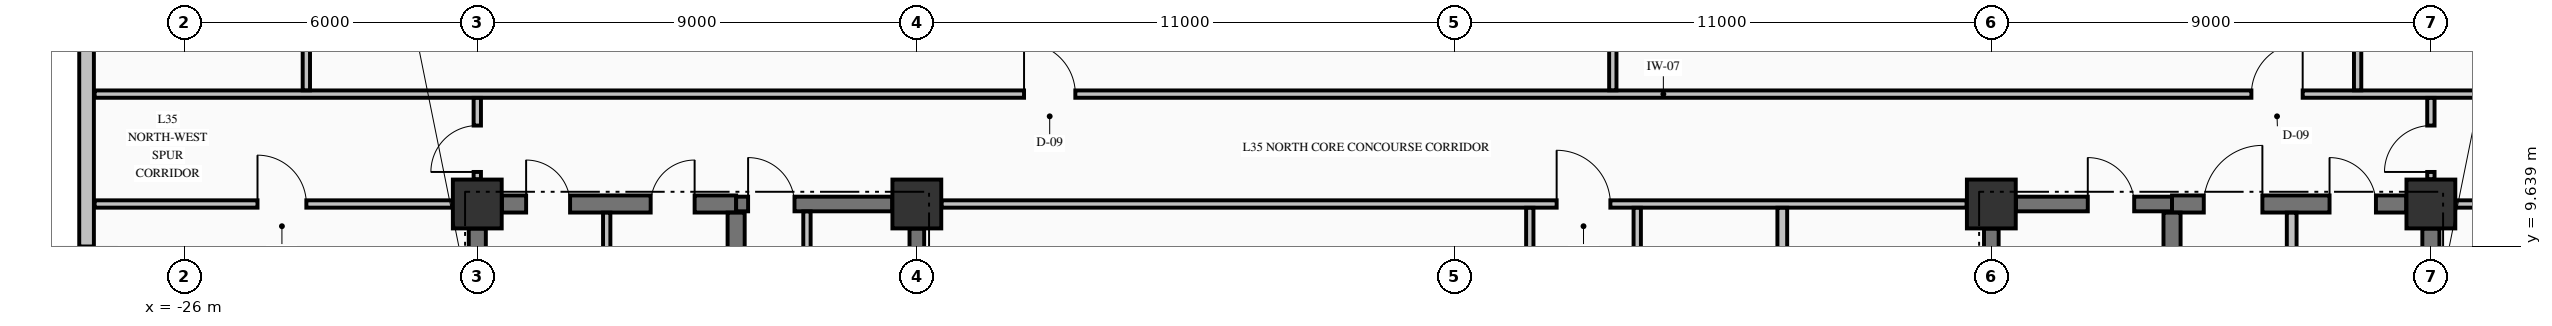
"""IFC4 building model, lengths in metres.
Left out: names, types, materials, properties, quantities, classifications, styles, units other than length and angle.
Written with IfcOpenShell. Run it as: python <this file> out.ifc"""

import sys

from ifc_helpers import new_model, si_unit, direction, frame, frame_2d, origin, origin_2d, place, context, subcontext, project, spatial, rectangle, extrude, element, fill, save


model = new_model("IFC4")
c1 = context("Model", 3, precision=1e-05, world=origin(), true_north=direction((0.0, 1.0)))
c2 = subcontext(c1, "Body", "Model", "MODEL_VIEW")
j1 = project(units=[si_unit("LENGTHUNIT", "METRE"), si_unit("PLANEANGLEUNIT", "RADIAN")], contexts=[c1])
p1 = place(None, origin())
s1 = spatial("IfcSite", under=j1, at=p1, CompositionType="ELEMENT")
p2 = place(p1, origin())
s2 = spatial("IfcBuilding", under=s1, at=p2, CompositionType="ELEMENT")
p3 = place(p2, frame((0.0, 0.0, 139.2)))
s3 = spatial("IfcBuildingStorey", under=s2, at=p3, CompositionType="ELEMENT", Elevation=139.2)
for number, where, z_axis, x_axis in (
    (1, (-20.0, 10.5, -0.25), (0.0, 0.0, 1.0), (1.0, 0.0, 0.0)),
    (2, (-11.0, 10.5, -0.25), (0.0, 0.0, 1.0), (1.0, 0.0, 0.0)),
    (3, (11.0, 10.5, -0.25), (0.0, 0.0, 1.0), (1.0, 0.0, 0.0)),
    (4, (20.0, 10.5, -0.25), (0.0, 0.0, 1.0), (1.0, 0.0, 0.0)),
):
    element("IfcColumn", number, at=place(p3, frame(where, z_axis=z_axis, x_axis=x_axis)), inside=s3, PredefinedType="COLUMN", context=c2, shape_type="SweptSolid", body=[
        extrude(rectangle(XDim=1.0, YDim=1.0, at=origin_2d()), origin(), (0.0, 0.0, 1.0), 3.495),
    ])
p4 = place(p3, frame((-28.0, 20.37, 0.0), z_axis=(0.0, 0.0, 1.0), x_axis=(0.0, -1.0, 0.0)))
e5 = element("IfcWall", 5, at=p4, inside=s3, PredefinedType="STANDARD", context=c2, shape_type="SweptSolid", body=[
    extrude(rectangle(XDim=10.74, YDim=0.3, at=frame_2d((5.37, 0.0))), origin(), (0.0, 0.0, 1.0), 2.637),
])
p5 = place(p3, frame((-19.496, 10.5, 0.0), z_axis=(0.0, 0.0, 1.0), x_axis=(1.0, 0.0, 0.0)))
e6 = element("IfcWall", 6, at=p5, inside=s3, PredefinedType="SHEAR", context=c2, shape_type="SweptSolid", body=[
    extrude(rectangle(XDim=4.796, YDim=0.35, at=frame_2d((2.398, 0.0))), origin(), (0.0, 0.0, 1.0), 3.245),
])
p6 = place(p5, frame((0.496, 0.0, 0.0)))
e7 = element("IfcOpeningElement", 7, at=p6, cuts=e6, PredefinedType="OPENING", context=c2, shape_type="SweptSolid", body=[
    extrude(rectangle(XDim=0.9, YDim=2.15, at=frame_2d((0.45, 1.075))), frame((0.0, 0.185, 0.0), z_axis=(0.0, -1.0, 0.0), x_axis=(1.0, 0.0, 0.0)), (0.0, 0.0, 1.0), 0.37),
])
p7 = place(p5, frame((3.046, 0.0, 0.0)))
e8 = element("IfcOpeningElement", 8, at=p7, cuts=e6, PredefinedType="OPENING", context=c2, shape_type="SweptSolid", body=[
    extrude(rectangle(XDim=0.9, YDim=2.15, at=frame_2d((0.45, 1.075))), frame((0.0, 0.185, 0.0), z_axis=(0.0, -1.0, 0.0), x_axis=(1.0, 0.0, 0.0)), (0.0, 0.0, 1.0), 0.37),
])
p8 = place(p3, frame((-14.7, 10.5, 0.0), z_axis=(0.0, 0.0, 1.0), x_axis=(1.0, 0.0, 0.0)))
e9 = element("IfcWall", 9, at=p8, inside=s3, PredefinedType="SHEAR", context=c2, shape_type="SweptSolid", body=[
    extrude(rectangle(XDim=3.196, YDim=0.3, at=frame_2d((1.598, 0.0))), origin(), (0.0, 0.0, 1.0), 3.245),
])
p9 = place(p8, frame((0.245, 0.0, 0.0)))
e10 = element("IfcOpeningElement", 10, at=p9, cuts=e9, PredefinedType="OPENING", context=c2, shape_type="SweptSolid", body=[
    extrude(rectangle(XDim=0.95, YDim=2.15, at=frame_2d((0.475, 1.075))), frame((0.0, 0.16, 0.0), z_axis=(0.0, -1.0, 0.0), x_axis=(1.0, 0.0, 0.0)), (0.0, 0.0, 1.0), 0.32),
])
p10 = place(p3, frame((11.504, 10.5, 0.0), z_axis=(0.0, 0.0, 1.0), x_axis=(1.0, 0.0, 0.0)))
e11 = element("IfcWall", 11, at=p10, inside=s3, PredefinedType="SHEAR", context=c2, shape_type="SweptSolid", body=[
    extrude(rectangle(XDim=3.196, YDim=0.3, at=frame_2d((1.598, 0.0))), origin(), (0.0, 0.0, 1.0), 3.245),
])
p11 = place(p10, frame((1.471, 0.0, 0.0)))
e12 = element("IfcOpeningElement", 12, at=p11, cuts=e11, PredefinedType="OPENING", context=c2, shape_type="SweptSolid", body=[
    extrude(rectangle(XDim=0.95, YDim=2.15, at=frame_2d((0.475, 1.075))), frame((0.0, 0.16, 0.0), z_axis=(0.0, -1.0, 0.0), x_axis=(1.0, 0.0, 0.0)), (0.0, 0.0, 1.0), 0.32),
])
p12 = place(p3, frame((14.7, 10.5, 0.0), z_axis=(0.0, 0.0, 1.0), x_axis=(1.0, 0.0, 0.0)))
e13 = element("IfcWall", 13, at=p12, inside=s3, PredefinedType="SHEAR", context=c2, shape_type="SweptSolid", body=[
    extrude(rectangle(XDim=4.796, YDim=0.35, at=frame_2d((2.398, 0.0))), origin(), (0.0, 0.0, 1.0), 3.245),
])
p13 = place(p12, frame((0.65, 0.0, 0.0)))
e14 = element("IfcOpeningElement", 14, at=p13, cuts=e13, PredefinedType="OPENING", context=c2, shape_type="SweptSolid", body=[
    extrude(rectangle(XDim=1.2, YDim=2.15, at=frame_2d((0.6, 1.075))), frame((0.0, 0.185, 0.0), z_axis=(0.0, -1.0, 0.0), x_axis=(1.0, 0.0, 0.0)), (0.0, 0.0, 1.0), 0.37),
])
p14 = place(p12, frame((3.225, 0.0, 0.0)))
e15 = element("IfcOpeningElement", 15, at=p14, cuts=e13, PredefinedType="OPENING", context=c2, shape_type="SweptSolid", body=[
    extrude(rectangle(XDim=0.95, YDim=2.15, at=frame_2d((0.475, 1.075))), frame((0.0, 0.185, 0.0), z_axis=(0.0, -1.0, 0.0), x_axis=(1.0, 0.0, 0.0)), (0.0, 0.0, 1.0), 0.37),
])
p15 = place(p3, frame((-27.835, 10.5, 0.0), z_axis=(0.0, 0.0, 1.0), x_axis=(1.0, 0.0, 0.0)))
e16 = element("IfcWall", 16, at=p15, inside=s3, PredefinedType="PARTITIONING", context=c2, shape_type="SweptSolid", body=[
    extrude(rectangle(XDim=7.329, YDim=0.15, at=frame_2d((3.665, 0.0))), origin(), (0.0, 0.0, 1.0), 3.245),
])
p16 = place(p15, frame((3.335, 0.0, 0.0)))
e17 = element("IfcOpeningElement", 17, at=p16, cuts=e16, PredefinedType="OPENING", context=c2, shape_type="SweptSolid", body=[
    extrude(rectangle(XDim=1.0, YDim=2.15, at=frame_2d((0.5, 1.075))), frame((0.0, 0.085, 0.0), z_axis=(0.0, -1.0, 0.0), x_axis=(1.0, 0.0, 0.0)), (0.0, 0.0, 1.0), 0.17),
])
p17 = place(p3, frame((-10.494, 10.5, 0.0), z_axis=(0.0, 0.0, 1.0), x_axis=(1.0, 0.0, 0.0)))
e18 = element("IfcWall", 18, at=p17, inside=s3, PredefinedType="PARTITIONING", context=c2, shape_type="SweptSolid", body=[
    extrude(rectangle(XDim=20.988, YDim=0.15, at=frame_2d((10.494, 0.0))), origin(), (0.0, 0.0, 1.0), 3.245),
])
p18 = place(p17, frame((12.594, 0.0, 0.0)))
e19 = element("IfcOpeningElement", 19, at=p18, cuts=e18, PredefinedType="OPENING", context=c2, shape_type="SweptSolid", body=[
    extrude(rectangle(XDim=1.1, YDim=2.15, at=frame_2d((0.55, 1.075))), frame((0.0, 0.085, 0.0), z_axis=(0.0, -1.0, 0.0), x_axis=(1.0, 0.0, 0.0)), (0.0, 0.0, 1.0), 0.17),
])
p19 = place(p3, frame((20.506, 10.5, 0.0), z_axis=(0.0, 0.0, 1.0), x_axis=(1.0, 0.0, 0.0)))
e20 = element("IfcWall", 20, at=p19, inside=s3, PredefinedType="PARTITIONING", context=c2, shape_type="SweptSolid", body=[
    extrude(rectangle(XDim=2.329, YDim=0.15, at=frame_2d((1.165, 0.0))), origin(), (0.0, 0.0, 1.0), 3.245),
])
p20 = place(p19, frame((0.519, 0.0, 0.0)))
e21 = element("IfcOpeningElement", 21, at=p20, cuts=e20, PredefinedType="OPENING", context=c2, shape_type="SweptSolid", body=[
    extrude(rectangle(XDim=0.95, YDim=2.15, at=frame_2d((0.475, 1.075))), frame((0.0, 0.085, 0.0), z_axis=(0.0, -1.0, 0.0), x_axis=(1.0, 0.0, 0.0)), (0.0, 0.0, 1.0), 0.17),
])
p21 = place(p3, frame((-27.835, 12.75, 0.0), z_axis=(0.0, 0.0, 1.0), x_axis=(1.0, 0.0, 0.0)))
e22 = element("IfcWall", 22, at=p21, inside=s3, PredefinedType="PARTITIONING", context=c2, shape_type="SweptSolid", body=[
    extrude(rectangle(XDim=50.67, YDim=0.15, at=frame_2d((25.335, 0.0))), origin(), (0.0, 0.0, 1.0), 3.245),
])
p22 = place(p21, frame((19.03, 0.0, 0.0)))
e23 = element("IfcOpeningElement", 23, at=p22, cuts=e22, PredefinedType="OPENING", context=c2, shape_type="SweptSolid", body=[
    extrude(rectangle(XDim=1.05, YDim=2.15, at=frame_2d((0.525, 1.075))), frame((0.0, 0.085, 0.0), z_axis=(0.0, -1.0, 0.0), x_axis=(1.0, 0.0, 0.0)), (0.0, 0.0, 1.0), 0.17),
])
p23 = place(p21, frame((44.16, 0.0, 0.0)))
e24 = element("IfcOpeningElement", 24, at=p23, cuts=e22, PredefinedType="OPENING", context=c2, shape_type="SweptSolid", body=[
    extrude(rectangle(XDim=1.05, YDim=2.15, at=frame_2d((0.525, 1.075))), frame((0.0, 0.085, 0.0), z_axis=(0.0, -1.0, 0.0), x_axis=(1.0, 0.0, 0.0)), (0.0, 0.0, 1.0), 0.17),
])
p24 = place(p3, frame((-20.0, 0.504, 0.0), z_axis=(0.0, 0.0, 1.0), x_axis=(0.0, 1.0, 0.0)))
e25 = element("IfcWall", 25, at=p24, inside=s3, PredefinedType="SHEAR", context=c2, shape_type="SweptSolid", body=[
    extrude(rectangle(XDim=9.492, YDim=0.35, at=frame_2d((4.746, 0.0))), origin(), (0.0, 0.0, 1.0), 3.245),
])
p25 = place(p3, frame((-14.7, 5.852, 0.0), z_axis=(0.0, 0.0, 1.0), x_axis=(0.0, 1.0, 0.0)))
e26 = element("IfcWall", 26, at=p25, inside=s3, PredefinedType="SHEAR", context=c2, shape_type="SweptSolid", body=[
    extrude(rectangle(XDim=4.471, YDim=0.35, at=frame_2d((2.235, 0.0))), origin(), (0.0, 0.0, 1.0), 3.245),
])
for number, where, z_axis, x_axis in (
    (27, (-11.0, 5.852, 0.0), (0.0, 0.0, 1.0), (0.0, 1.0, 0.0)),
    (28, (11.0, 5.852, 0.0), (0.0, 0.0, 1.0), (0.0, 1.0, 0.0)),
):
    element("IfcWall", number, at=place(p3, frame(where, z_axis=z_axis, x_axis=x_axis)), inside=s3, PredefinedType="SHEAR", context=c2, shape_type="SweptSolid", body=[
        extrude(rectangle(XDim=4.144, YDim=0.3, at=frame_2d((2.072, 0.0))), origin(), (0.0, 0.0, 1.0), 3.245),
    ])
p26 = place(p3, frame((14.7, 5.852, 0.0), z_axis=(0.0, 0.0, 1.0), x_axis=(0.0, 1.0, 0.0)))
e29 = element("IfcWall", 29, at=p26, inside=s3, PredefinedType="SHEAR", context=c2, shape_type="SweptSolid", body=[
    extrude(rectangle(XDim=4.471, YDim=0.35, at=frame_2d((2.235, 0.0))), origin(), (0.0, 0.0, 1.0), 3.245),
])
p27 = place(p3, frame((20.0, 5.377, 0.0), z_axis=(0.0, 0.0, 1.0), x_axis=(0.0, 1.0, 0.0)))
e30 = element("IfcWall", 30, at=p27, inside=s3, PredefinedType="SHEAR", context=c2, shape_type="SweptSolid", body=[
    extrude(rectangle(XDim=4.619, YDim=0.35, at=frame_2d((2.31, 0.0))), origin(), (0.0, 0.0, 1.0), 3.245),
])
p28 = place(p3, frame((-23.5, 12.828, 0.0), z_axis=(0.0, 0.0, 1.0), x_axis=(0.0, 1.0, 0.0)))
e31 = element("IfcWall", 31, at=p28, inside=s3, PredefinedType="PARTITIONING", context=c2, shape_type="SweptSolid", body=[
    extrude(rectangle(XDim=7.566, YDim=0.15, at=frame_2d((3.783, 0.0))), origin(), (0.0, 0.0, 1.0), 3.245),
])
p29 = place(p3, frame((-20.0, 11.006, 0.0), z_axis=(0.0, 0.0, 1.0), x_axis=(0.0, 1.0, 0.0)))
e32 = element("IfcWall", 32, at=p29, inside=s3, PredefinedType="PARTITIONING", context=c2, shape_type="SweptSolid", body=[
    extrude(rectangle(XDim=1.666, YDim=0.15, at=frame_2d((0.833, 0.0))), origin(), (0.0, 0.0, 1.0), 2.735),
])
p30 = place(p29, frame((0.15, 0.0, 0.0)))
e33 = element("IfcOpeningElement", 33, at=p30, cuts=e32, PredefinedType="OPENING", context=c2, shape_type="SweptSolid", body=[
    extrude(rectangle(XDim=0.95, YDim=2.15, at=frame_2d((0.475, 1.075))), frame((0.0, 0.085, 0.0), z_axis=(0.0, -1.0, 0.0), x_axis=(1.0, 0.0, 0.0)), (0.0, 0.0, 1.0), 0.17),
])
p31 = place(p3, frame((-17.35, -0.097, 0.0), z_axis=(0.0, 0.0, 1.0), x_axis=(0.0, 1.0, 0.0)))
e34 = element("IfcWall", 34, at=p31, inside=s3, PredefinedType="PARTITIONING", context=c2, shape_type="SweptSolid", body=[
    extrude(rectangle(XDim=10.419, YDim=0.15, at=frame_2d((5.209, 0.0))), origin(), (0.0, 0.0, 1.0), 3.245),
])
p32 = place(p3, frame((-13.25, 5.853, 0.0), z_axis=(0.0, 0.0, 1.0), x_axis=(0.0, 1.0, 0.0)))
e35 = element("IfcWall", 35, at=p32, inside=s3, PredefinedType="PARTITIONING", context=c2, shape_type="SweptSolid", body=[
    extrude(rectangle(XDim=4.494, YDim=0.15, at=frame_2d((2.247, 0.0))), origin(), (0.0, 0.0, 1.0), 3.245),
])
p33 = place(p32, frame((1.472, 0.0, 0.0)))
e36 = element("IfcOpeningElement", 36, at=p33, cuts=e35, PredefinedType="OPENING", context=c2, shape_type="SweptSolid", body=[
    extrude(rectangle(XDim=0.95, YDim=2.15, at=frame_2d((0.475, 1.075))), frame((0.0, 0.085, 0.0), z_axis=(0.0, -1.0, 0.0), x_axis=(1.0, 0.0, 0.0)), (0.0, 0.0, 1.0), 0.17),
])
p34 = place(p3, frame((1.55, 2.978, 0.0), z_axis=(0.0, 0.0, 1.0), x_axis=(0.0, 1.0, 0.0)))
e37 = element("IfcWall", 37, at=p34, inside=s3, PredefinedType="PARTITIONING", context=c2, shape_type="SweptSolid", body=[
    extrude(rectangle(XDim=7.444, YDim=0.15, at=frame_2d((3.722, 0.0))), origin(), (0.0, 0.0, 1.0), 3.245),
])
p35 = place(p3, frame((3.25, 12.828, 0.0), z_axis=(0.0, 0.0, 1.0), x_axis=(0.0, 1.0, 0.0)))
e38 = element("IfcWall", 38, at=p35, inside=s3, PredefinedType="PARTITIONING", context=c2, shape_type="SweptSolid", body=[
    extrude(rectangle(XDim=12.507, YDim=0.15, at=frame_2d((6.253, 0.0))), origin(), (0.0, 0.0, 1.0), 3.245),
])
p36 = place(p3, frame((3.75, 2.978, 0.0), z_axis=(0.0, 0.0, 1.0), x_axis=(0.0, 1.0, 0.0)))
e39 = element("IfcWall", 39, at=p36, inside=s3, PredefinedType="PARTITIONING", context=c2, shape_type="SweptSolid", body=[
    extrude(rectangle(XDim=7.444, YDim=0.15, at=frame_2d((3.722, 0.0))), origin(), (0.0, 0.0, 1.0), 3.245),
])
p37 = place(p3, frame((6.72, 2.978, 0.0), z_axis=(0.0, 0.0, 1.0), x_axis=(0.0, 1.0, 0.0)))
e40 = element("IfcWall", 40, at=p37, inside=s3, PredefinedType="PARTITIONING", context=c2, shape_type="SweptSolid", body=[
    extrude(rectangle(XDim=7.444, YDim=0.2, at=frame_2d((3.722, 0.0))), origin(), (0.0, 0.0, 1.0), 3.245),
])
p38 = place(p3, frame((17.15, 7.928, 0.0), z_axis=(0.0, 0.0, 1.0), x_axis=(0.0, 1.0, 0.0)))
e41 = element("IfcWall", 41, at=p38, inside=s3, PredefinedType="PARTITIONING", context=c2, shape_type="SweptSolid", body=[
    extrude(rectangle(XDim=2.394, YDim=0.2, at=frame_2d((1.197, 0.0))), origin(), (0.0, 0.0, 1.0), 3.245),
])
p39 = place(p3, frame((18.5, 12.828, 0.0), z_axis=(0.0, 0.0, 1.0), x_axis=(0.0, 1.0, 0.0)))
e42 = element("IfcWall", 42, at=p39, inside=s3, PredefinedType="PARTITIONING", context=c2, shape_type="SweptSolid", body=[
    extrude(rectangle(XDim=7.566, YDim=0.15, at=frame_2d((3.783, 0.0))), origin(), (0.0, 0.0, 1.0), 3.245),
])
p40 = place(p3, frame((20.0, 11.006, 0.0), z_axis=(0.0, 0.0, 1.0), x_axis=(0.0, 1.0, 0.0)))
e43 = element("IfcWall", 43, at=p40, inside=s3, PredefinedType="PARTITIONING", context=c2, shape_type="SweptSolid", body=[
    extrude(rectangle(XDim=1.666, YDim=0.15, at=frame_2d((0.833, 0.0))), origin(), (0.0, 0.0, 1.0), 2.735),
])
p41 = place(p40, frame((0.15, 0.0, 0.0)))
e44 = element("IfcOpeningElement", 44, at=p41, cuts=e43, PredefinedType="OPENING", context=c2, shape_type="SweptSolid", body=[
    extrude(rectangle(XDim=0.95, YDim=2.15, at=frame_2d((0.475, 1.075))), frame((0.0, 0.085, 0.0), z_axis=(0.0, -1.0, 0.0), x_axis=(1.0, 0.0, 0.0)), (0.0, 0.0, 1.0), 0.17),
])
p42 = place(p9, origin())
e45 = element("IfcDoor", 45, at=p42, inside=s3, OperationType="SINGLE_SWING_LEFT", PredefinedType="DOOR", context=c2, shape_type="SweptSolid", body=[
    extrude(rectangle(XDim=0.95, YDim=2.15, at=frame_2d((0.475, 1.075))), frame((0.0, 0.025, 0.0), z_axis=(0.0, -1.0, 0.0), x_axis=(1.0, 0.0, 0.0)), (0.0, 0.0, 1.0), 0.05),
])
fill(e10, e45)
p43 = place(p11, origin())
e46 = element("IfcDoor", 46, at=p43, inside=s3, OperationType="SINGLE_SWING_LEFT", PredefinedType="DOOR", context=c2, shape_type="SweptSolid", body=[
    extrude(rectangle(XDim=0.95, YDim=2.15, at=frame_2d((0.475, 1.075))), frame((0.0, 0.025, 0.0), z_axis=(0.0, -1.0, 0.0), x_axis=(1.0, 0.0, 0.0)), (0.0, 0.0, 1.0), 0.05),
])
fill(e12, e46)
p44 = place(p6, origin())
e47 = element("IfcDoor", 47, at=p44, inside=s3, OperationType="SINGLE_SWING_LEFT", PredefinedType="DOOR", context=c2, shape_type="SweptSolid", body=[
    extrude(rectangle(XDim=0.9, YDim=2.15, at=frame_2d((0.45, 1.075))), frame((0.0, 0.025, 0.0), z_axis=(0.0, -1.0, 0.0), x_axis=(1.0, 0.0, 0.0)), (0.0, 0.0, 1.0), 0.05),
])
fill(e7, e47)
p45 = place(p7, origin())
e48 = element("IfcDoor", 48, at=p45, inside=s3, OperationType="SINGLE_SWING_RIGHT", PredefinedType="DOOR", context=c2, shape_type="SweptSolid", body=[
    extrude(rectangle(XDim=0.9, YDim=2.15, at=frame_2d((0.45, 1.075))), frame((0.0, 0.025, 0.0), z_axis=(0.0, -1.0, 0.0), x_axis=(1.0, 0.0, 0.0)), (0.0, 0.0, 1.0), 0.05),
])
fill(e8, e48)
p46 = place(p13, origin())
e49 = element("IfcDoor", 49, at=p46, inside=s3, OperationType="SINGLE_SWING_RIGHT", PredefinedType="DOOR", context=c2, shape_type="SweptSolid", body=[
    extrude(rectangle(XDim=1.2, YDim=2.15, at=frame_2d((0.6, 1.075))), frame((0.0, 0.025, 0.0), z_axis=(0.0, -1.0, 0.0), x_axis=(1.0, 0.0, 0.0)), (0.0, 0.0, 1.0), 0.05),
])
fill(e14, e49)
p47 = place(p14, origin())
e50 = element("IfcDoor", 50, at=p47, inside=s3, OperationType="SINGLE_SWING_LEFT", PredefinedType="DOOR", context=c2, shape_type="SweptSolid", body=[
    extrude(rectangle(XDim=0.95, YDim=2.15, at=frame_2d((0.475, 1.075))), frame((0.0, 0.025, 0.0), z_axis=(0.0, -1.0, 0.0), x_axis=(1.0, 0.0, 0.0)), (0.0, 0.0, 1.0), 0.05),
])
fill(e15, e50)
p48 = place(p18, origin())
e51 = element("IfcDoor", 51, at=p48, inside=s3, OperationType="SINGLE_SWING_LEFT", PredefinedType="DOOR", context=c2, shape_type="SweptSolid", body=[
    extrude(rectangle(XDim=1.1, YDim=2.15, at=frame_2d((0.55, 1.075))), frame((0.0, 0.025, 0.0), z_axis=(0.0, -1.0, 0.0), x_axis=(1.0, 0.0, 0.0)), (0.0, 0.0, 1.0), 0.05),
])
fill(e19, e51)
p49 = place(p22, origin())
e52 = element("IfcDoor", 52, at=p49, inside=s3, OperationType="SINGLE_SWING_LEFT", PredefinedType="DOOR", context=c2, shape_type="SweptSolid", body=[
    extrude(rectangle(XDim=1.05, YDim=2.15, at=frame_2d((0.525, 1.075))), frame((0.0, 0.025, 0.0), z_axis=(0.0, -1.0, 0.0), x_axis=(1.0, 0.0, 0.0)), (0.0, 0.0, 1.0), 0.05),
])
fill(e23, e52)
p50 = place(p23, origin())
e53 = element("IfcDoor", 53, at=p50, inside=s3, OperationType="SINGLE_SWING_RIGHT", PredefinedType="DOOR", context=c2, shape_type="SweptSolid", body=[
    extrude(rectangle(XDim=1.05, YDim=2.15, at=frame_2d((0.525, 1.075))), frame((0.0, 0.025, 0.0), z_axis=(0.0, -1.0, 0.0), x_axis=(1.0, 0.0, 0.0)), (0.0, 0.0, 1.0), 0.05),
])
fill(e24, e53)
p51 = place(p30, origin())
e54 = element("IfcDoor", 54, at=p51, inside=s3, OperationType="SINGLE_SWING_LEFT", PredefinedType="DOOR", context=c2, shape_type="SweptSolid", body=[
    extrude(rectangle(XDim=0.95, YDim=2.15, at=frame_2d((0.475, 1.075))), frame((0.0, 0.025, 0.0), z_axis=(0.0, -1.0, 0.0), x_axis=(1.0, 0.0, 0.0)), (0.0, 0.0, 1.0), 0.05),
])
fill(e33, e54)
p52 = place(p16, origin())
e55 = element("IfcDoor", 55, at=p52, inside=s3, OperationType="SINGLE_SWING_LEFT", PredefinedType="DOOR", context=c2, shape_type="SweptSolid", body=[
    extrude(rectangle(XDim=1.0, YDim=2.15, at=frame_2d((0.5, 1.075))), frame((0.0, 0.025, 0.0), z_axis=(0.0, -1.0, 0.0), x_axis=(1.0, 0.0, 0.0)), (0.0, 0.0, 1.0), 0.05),
])
fill(e17, e55)
p53 = place(p41, origin())
e56 = element("IfcDoor", 56, at=p53, inside=s3, OperationType="SINGLE_SWING_LEFT", PredefinedType="DOOR", context=c2, shape_type="SweptSolid", body=[
    extrude(rectangle(XDim=0.95, YDim=2.15, at=frame_2d((0.475, 1.075))), frame((0.0, 0.025, 0.0), z_axis=(0.0, -1.0, 0.0), x_axis=(1.0, 0.0, 0.0)), (0.0, 0.0, 1.0), 0.05),
])
fill(e44, e56)
save(model, sys.argv[1])
